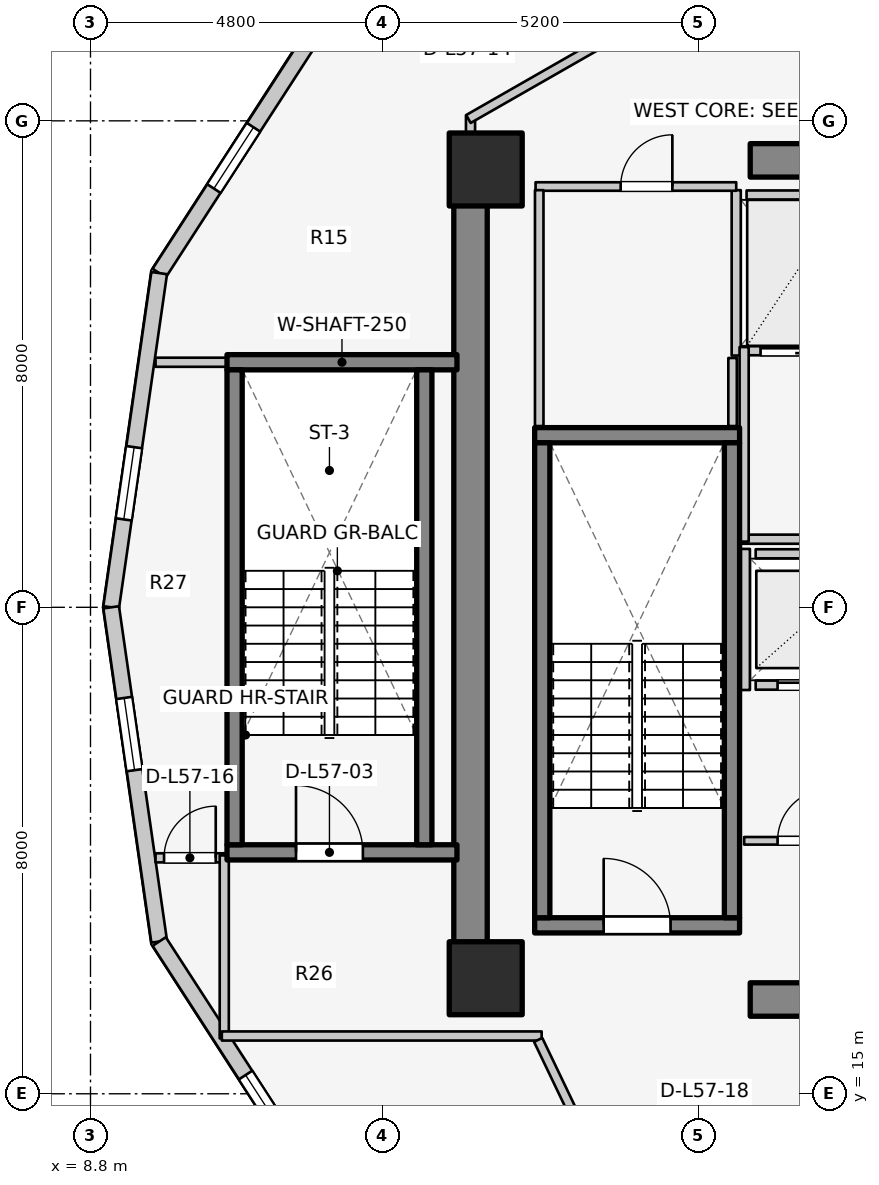
"""IFC4 building model, lengths in metres.
Left out: names, types, materials, properties, quantities, classifications, styles, units other than length and angle.
Written with IfcOpenShell. Run it as: python <this file> out.ifc"""

import sys

from ifc_helpers import new_model, si_unit, direction, frame, frame_2d, origin, origin_2d, place, context, subcontext, project, spatial, rectangle, extrude, element, fill, save


model = new_model("IFC4")
c1 = context("Model", 3, precision=1e-05, world=origin(), true_north=direction((0.0, 1.0)))
c2 = subcontext(c1, "Body", "Model", "MODEL_VIEW")
j1 = project(units=[si_unit("LENGTHUNIT", "METRE"), si_unit("PLANEANGLEUNIT", "RADIAN")], contexts=[c1])
p1 = place(None, origin())
s1 = spatial("IfcSite", under=j1, at=p1, CompositionType="ELEMENT")
p2 = place(p1, origin())
s2 = spatial("IfcBuilding", under=s1, at=p2, CompositionType="ELEMENT")
p3 = place(p2, frame((0.0, 0.0, 187.0)))
s3 = spatial("IfcBuildingStorey", under=s2, at=p3, CompositionType="ELEMENT", Elevation=187.0)
p4 = place(p3, frame((15.05, 17.05, 0.0), z_axis=(0.0, 0.0, 1.0), x_axis=(0.0, 1.0, 0.0)))
e1 = element("IfcWall", 1, at=p4, inside=s3, PredefinedType="SHEAR", context=c2, shape_type="SweptSolid", body=[
    extrude(rectangle(XDim=12.8, YDim=0.55, at=frame_2d((6.4, 0.0))), origin(), (0.0, 0.0, 1.0), 3.1),
])
for number, where, z_axis, x_axis in (
    (2, (19.65, 16.55, 0.0), (0.0, 0.0, 1.0), (1.0, 0.0, 0.0)),
    (3, (19.65, 30.35, 0.0), (0.0, 0.0, 1.0), (1.0, 0.0, 0.0)),
):
    element("IfcWall", number, at=place(p3, frame(where, z_axis=z_axis, x_axis=x_axis)), inside=s3, PredefinedType="SHEAR", context=c2, shape_type="SweptSolid", body=[
        extrude(rectangle(XDim=4.5, YDim=0.55, at=frame_2d((2.25, 0.0))), origin(), (0.0, 0.0, 1.0), 3.1),
    ])
p5 = place(p3, frame((16.105, 17.77, 0.0), z_axis=(0.0, 0.0, 1.0), x_axis=(1.0, 0.0, 0.0)))
e4 = element("IfcWall", 4, at=p5, inside=s3, PredefinedType="SOLIDWALL", context=c2, shape_type="SweptSolid", body=[
    extrude(rectangle(XDim=3.37, YDim=0.25, at=frame_2d((1.685, 0.0))), origin(), (0.0, 0.0, 1.0), 3.1),
])
p6 = place(p5, frame((1.135, 0.0, 0.0)))
e5 = element("IfcOpeningElement", 5, at=p6, cuts=e4, PredefinedType="OPENING", context=c2, shape_type="SweptSolid", body=[
    extrude(rectangle(XDim=1.1, YDim=2.1, at=frame_2d((0.55, 1.05))), frame((0.0, 0.135, 0.0), z_axis=(0.0, -1.0, 0.0), x_axis=(1.0, 0.0, 0.0)), (0.0, 0.0, 1.0), 0.27),
])
p7 = place(p3, frame((16.105, 25.83, 0.0), z_axis=(0.0, 0.0, 1.0), x_axis=(1.0, 0.0, 0.0)))
e6 = element("IfcWall", 6, at=p7, inside=s3, PredefinedType="SOLIDWALL", context=c2, shape_type="SweptSolid", body=[
    extrude(rectangle(XDim=3.37, YDim=0.25, at=frame_2d((1.685, 0.0))), origin(), (0.0, 0.0, 1.0), 3.1),
])
for number, where, z_axis, x_axis in (
    (7, (16.23, 17.895, 0.0), (0.0, 0.0, 1.0), (0.0, 1.0, 0.0)),
    (8, (19.35, 17.895, 0.0), (0.0, 0.0, 1.0), (0.0, 1.0, 0.0)),
):
    element("IfcWall", number, at=place(p3, frame(where, z_axis=z_axis, x_axis=x_axis)), inside=s3, PredefinedType="SOLIDWALL", context=c2, shape_type="SweptSolid", body=[
        extrude(rectangle(XDim=7.81, YDim=0.25, at=frame_2d((3.905, 0.0))), origin(), (0.0, 0.0, 1.0), 3.1),
    ])
p8 = place(p3, frame((11.045, 18.97, 0.0), z_axis=(0.0, 0.0, 1.0), x_axis=(1.0, 0.0, 0.0)))
e9 = element("IfcWall", 9, at=p8, inside=s3, PredefinedType="SOLIDWALL", context=c2, shape_type="SweptSolid", body=[
    extrude(rectangle(XDim=3.782, YDim=0.25, at=frame_2d((1.891, 0.0))), origin(), (0.0, 0.0, 1.0), 3.1),
])
p9 = place(p8, frame((1.135, 0.0, 0.0)))
e10 = element("IfcOpeningElement", 10, at=p9, cuts=e9, PredefinedType="OPENING", context=c2, shape_type="SweptSolid", body=[
    extrude(rectangle(XDim=1.1, YDim=2.1, at=frame_2d((0.55, 1.05))), frame((0.0, 0.135, 0.0), z_axis=(0.0, -1.0, 0.0), x_axis=(1.0, 0.0, 0.0)), (0.0, 0.0, 1.0), 0.27),
])
p10 = place(p3, frame((11.045, 27.03, 0.0), z_axis=(0.0, 0.0, 1.0), x_axis=(1.0, 0.0, 0.0)))
e11 = element("IfcWall", 11, at=p10, inside=s3, PredefinedType="SOLIDWALL", context=c2, shape_type="SweptSolid", body=[
    extrude(rectangle(XDim=3.782, YDim=0.25, at=frame_2d((1.891, 0.0))), origin(), (0.0, 0.0, 1.0), 3.1),
])
for number, where, z_axis, x_axis in (
    (12, (11.17, 19.095, 0.0), (0.0, 0.0, 1.0), (0.0, 1.0, 0.0)),
    (13, (14.29, 19.095, 0.0), (0.0, 0.0, 1.0), (0.0, 1.0, 0.0)),
):
    element("IfcWall", number, at=place(p3, frame(where, z_axis=z_axis, x_axis=x_axis)), inside=s3, PredefinedType="SOLIDWALL", context=c2, shape_type="SweptSolid", body=[
        extrude(rectangle(XDim=7.81, YDim=0.25, at=frame_2d((3.905, 0.0))), origin(), (0.0, 0.0, 1.0), 3.1),
    ])
for number, where, z_axis, x_axis in (
    (14, (15.3, 16.9, 0.0), (0.0, 0.0, 1.0), (1.0, 0.0, 0.0)),
    (15, (15.3, 30.2, 0.0), (0.0, 0.0, 1.0), (1.0, 0.0, 0.0)),
):
    element("IfcColumn", number, at=place(p3, frame(where, z_axis=z_axis, x_axis=x_axis)), inside=s3, PredefinedType="COLUMN", context=c2, shape_type="SweptSolid", body=[
        extrude(rectangle(XDim=1.2, YDim=1.2, at=origin_2d()), origin(), (0.0, 0.0, 1.0), 3.1),
    ])
p11 = place(p3, frame((12.381, 32.284, 0.0), z_axis=(0.0, 0.0, 1.0), x_axis=(-0.543358984534, -0.839500454989, 0.0)))
e16 = element("IfcWall", 16, at=p11, inside=s3, PredefinedType="STANDARD", context=c2, shape_type="SweptSolid", body=[
    extrude(rectangle(XDim=4.511, YDim=0.26, at=frame_2d((2.256, 0.0))), origin(), (0.0, 0.0, 1.0), 1.22),
])
p12 = place(p11, frame((1.656, 0.0, 0.15)))
e17 = element("IfcOpeningElement", 17, at=p12, cuts=e16, PredefinedType="OPENING", context=c2, shape_type="SweptSolid", body=[
    extrude(rectangle(XDim=1.2, YDim=0.9, at=frame_2d((0.6, 0.45))), frame((0.0, 0.14, 0.0), z_axis=(0.0, -1.0, 0.0), x_axis=(1.0, 0.0, 0.0)), (0.0, 0.0, 1.0), 0.28),
])
p13 = place(p3, frame((9.93, 28.497, 0.0), z_axis=(0.0, 0.0, 1.0), x_axis=(-0.142227632286, -0.989833976288, 0.0)))
e18 = element("IfcWall", 18, at=p13, inside=s3, PredefinedType="STANDARD", context=c2, shape_type="SweptSolid", body=[
    extrude(rectangle(XDim=5.553, YDim=0.26, at=frame_2d((2.776, 0.0))), origin(), (0.0, 0.0, 1.0), 2.57),
])
p14 = place(p13, frame((2.892, 0.0, 0.75)))
e19 = element("IfcOpeningElement", 19, at=p14, cuts=e18, PredefinedType="OPENING", context=c2, shape_type="SweptSolid", body=[
    extrude(rectangle(XDim=1.2, YDim=1.5, at=frame_2d((0.6, 0.75))), frame((0.0, 0.14, 0.0), z_axis=(0.0, -1.0, 0.0), x_axis=(1.0, 0.0, 0.0)), (0.0, 0.0, 1.0), 0.28),
])
p15 = place(p3, frame((9.14, 23.0, 0.0), z_axis=(0.0, 0.0, 1.0), x_axis=(0.142227632286, -0.989833976288, 0.0)))
e20 = element("IfcWall", 20, at=p15, inside=s3, PredefinedType="STANDARD", context=c2, shape_type="SweptSolid", body=[
    extrude(rectangle(XDim=5.553, YDim=0.26, at=frame_2d((2.776, 0.0))), origin(), (0.0, 0.0, 1.0), 2.57),
])
p16 = place(p15, frame((1.506, 0.0, 0.75)))
e21 = element("IfcOpeningElement", 21, at=p16, cuts=e20, PredefinedType="OPENING", context=c2, shape_type="SweptSolid", body=[
    extrude(rectangle(XDim=1.2, YDim=1.5, at=frame_2d((0.6, 0.75))), frame((0.0, 0.14, 0.0), z_axis=(0.0, -1.0, 0.0), x_axis=(1.0, 0.0, 0.0)), (0.0, 0.0, 1.0), 0.28),
])
p17 = place(p3, frame((9.93, 17.503, 0.0), z_axis=(0.0, 0.0, 1.0), x_axis=(0.543358984534, -0.839500454989, 0.0)))
e22 = element("IfcWall", 22, at=p17, inside=s3, PredefinedType="STANDARD", context=c2, shape_type="SweptSolid", body=[
    extrude(rectangle(XDim=4.511, YDim=0.26, at=frame_2d((2.256, 0.0))), origin(), (0.0, 0.0, 1.0), 1.22),
])
p18 = place(p17, frame((2.615, 0.0, 0.15)))
e23 = element("IfcOpeningElement", 23, at=p18, cuts=e22, PredefinedType="OPENING", context=c2, shape_type="SweptSolid", body=[
    extrude(rectangle(XDim=1.2, YDim=0.9, at=frame_2d((0.6, 0.45))), frame((0.0, 0.14, 0.0), z_axis=(0.0, -1.0, 0.0), x_axis=(1.0, 0.0, 0.0)), (0.0, 0.0, 1.0), 0.28),
])
p19 = place(p3, frame((19.74, 21.72, 0.0), z_axis=(0.0, 0.0, 1.0), x_axis=(1.0, 0.0, 0.0)))
e24 = element("IfcWall", 24, at=p19, inside=s3, PredefinedType="SOLIDWALL", context=c2, shape_type="SweptSolid", body=[
    extrude(rectangle(XDim=1.82, YDim=0.15, at=frame_2d((0.91, 0.0))), origin(), (0.0, 0.0, 1.0), 2.575),
])
p20 = place(p19, frame((0.36, 0.0, 0.0)))
e25 = element("IfcOpeningElement", 25, at=p20, cuts=e24, PredefinedType="OPENING", context=c2, shape_type="SweptSolid", body=[
    extrude(rectangle(XDim=1.1, YDim=2.1, at=frame_2d((0.55, 1.05))), frame((0.0, 0.085, 0.0), z_axis=(0.0, -1.0, 0.0), x_axis=(1.0, 0.0, 0.0)), (0.0, 0.0, 1.0), 0.17),
])
p21 = place(p3, frame((19.74, 23.88, 0.0), z_axis=(0.0, 0.0, 1.0), x_axis=(1.0, 0.0, 0.0)))
e26 = element("IfcWall", 26, at=p21, inside=s3, PredefinedType="SOLIDWALL", context=c2, shape_type="SweptSolid", body=[
    extrude(rectangle(XDim=1.82, YDim=0.15, at=frame_2d((0.91, 0.0))), origin(), (0.0, 0.0, 1.0), 2.575),
])
p22 = place(p3, frame((19.57, 21.64, 0.0), z_axis=(0.0, 0.0, 1.0), x_axis=(0.0, 1.0, 0.0)))
e27 = element("IfcWall", 27, at=p22, inside=s3, PredefinedType="SOLIDWALL", context=c2, shape_type="SweptSolid", body=[
    extrude(rectangle(XDim=2.32, YDim=0.15, at=frame_2d((1.16, 0.0))), origin(), (0.0, 0.0, 1.0), 2.575),
])
p23 = place(p3, frame((19.59, 27.22, 0.0), z_axis=(0.0, 0.0, 1.0), x_axis=(1.0, 0.0, 0.0)))
e28 = element("IfcWall", 28, at=p23, inside=s3, PredefinedType="SOLIDWALL", context=c2, shape_type="SweptSolid", body=[
    extrude(rectangle(XDim=1.76, YDim=0.15, at=frame_2d((0.88, 0.0))), origin(), (0.0, 0.0, 1.0), 2.575),
])
p24 = place(p23, frame((0.23, 0.0, 0.0)))
e29 = element("IfcOpeningElement", 29, at=p24, cuts=e28, PredefinedType="OPENING", context=c2, shape_type="SweptSolid", body=[
    extrude(rectangle(XDim=1.3, YDim=2.1, at=frame_2d((0.65, 1.05))), frame((0.0, 0.085, 0.0), z_axis=(0.0, -1.0, 0.0), x_axis=(1.0, 0.0, 0.0)), (0.0, 0.0, 1.0), 0.17),
])
p25 = place(p3, frame((19.59, 29.78, 0.0), z_axis=(0.0, 0.0, 1.0), x_axis=(1.0, 0.0, 0.0)))
e30 = element("IfcWall", 30, at=p25, inside=s3, PredefinedType="SOLIDWALL", context=c2, shape_type="SweptSolid", body=[
    extrude(rectangle(XDim=1.76, YDim=0.15, at=frame_2d((0.88, 0.0))), origin(), (0.0, 0.0, 1.0), 2.575),
])
p26 = place(p3, frame((19.42, 27.14, 0.0), z_axis=(0.0, 0.0, 1.0), x_axis=(0.0, 1.0, 0.0)))
e31 = element("IfcWall", 31, at=p26, inside=s3, PredefinedType="SOLIDWALL", context=c2, shape_type="SweptSolid", body=[
    extrude(rectangle(XDim=2.72, YDim=0.15, at=frame_2d((1.36, 0.0))), origin(), (0.0, 0.0, 1.0), 2.575),
])
p27 = place(p3, frame((19.52, 24.12, 0.0), z_axis=(0.0, 0.0, 1.0), x_axis=(1.0, 0.0, 0.0)))
e32 = element("IfcWall", 32, at=p27, inside=s3, PredefinedType="PARTITIONING", context=c2, shape_type="SweptSolid", body=[
    extrude(rectangle(XDim=5.08, YDim=0.15, at=frame_2d((2.54, 0.0))), origin(), (0.0, 0.0, 1.0), 2.12),
])
p28 = place(p3, frame((19.55, 24.08, 0.0), z_axis=(0.0, 0.0, 1.0), x_axis=(0.0, 1.0, 0.0)))
e33 = element("IfcWall", 33, at=p28, inside=s3, PredefinedType="PARTITIONING", context=c2, shape_type="SweptSolid", body=[
    extrude(rectangle(XDim=3.2, YDim=0.15, at=frame_2d((1.6, 0.0))), origin(), (0.0, 0.0, 1.0), 2.575),
])
p29 = place(p3, frame((19.55, 19.16, 0.0), z_axis=(0.0, 0.0, 1.0), x_axis=(1.0, 0.0, 0.0)))
e34 = element("IfcWall", 34, at=p29, inside=s3, PredefinedType="PARTITIONING", context=c2, shape_type="SweptSolid", body=[
    extrude(rectangle(XDim=3.45, YDim=0.125, at=frame_2d((1.725, 0.0))), origin(), (0.0, 0.0, 1.0), 2.12),
])
p30 = place(p29, frame((0.55, 0.0, 0.0)))
e35 = element("IfcOpeningElement", 35, at=p30, cuts=e34, PredefinedType="OPENING", context=c2, shape_type="SweptSolid", body=[
    extrude(rectangle(XDim=0.85, YDim=2.05, at=frame_2d((0.425, 1.025))), frame((0.0, 0.073, 0.0), z_axis=(0.0, -1.0, 0.0), x_axis=(1.0, 0.0, 0.0)), (0.0, 0.0, 1.0), 0.145),
])
p31 = place(p3, frame((16.12, 29.92, 0.0), z_axis=(0.0, 0.0, 1.0), x_axis=(1.0, 0.0, 0.0)))
e36 = element("IfcWall", 36, at=p31, inside=s3, PredefinedType="PLUMBINGWALL", context=c2, shape_type="SweptSolid", body=[
    extrude(rectangle(XDim=3.3, YDim=0.14, at=frame_2d((1.65, 0.0))), origin(), (0.0, 0.0, 1.0), 2.575),
])
p32 = place(p31, frame((1.399, 0.0, 0.0)))
e37 = element("IfcOpeningElement", 37, at=p32, cuts=e36, PredefinedType="OPENING", context=c2, shape_type="SweptSolid", body=[
    extrude(rectangle(XDim=0.85, YDim=2.05, at=frame_2d((0.425, 1.025))), frame((0.0, 0.08, 0.0), z_axis=(0.0, -1.0, 0.0), x_axis=(1.0, 0.0, 0.0)), (0.0, 0.0, 1.0), 0.16),
])
p33 = place(p3, frame((16.18, 25.98, 0.0), z_axis=(0.0, 0.0, 1.0), x_axis=(0.0, 1.0, 0.0)))
e38 = element("IfcWall", 38, at=p33, inside=s3, PredefinedType="PLUMBINGWALL", context=c2, shape_type="SweptSolid", body=[
    extrude(rectangle(XDim=3.88, YDim=0.14, at=frame_2d((1.94, 0.0))), origin(), (0.0, 0.0, 1.0), 2.575),
])
p34 = place(p3, frame((19.36, 25.98, 0.0), z_axis=(0.0, 0.0, 1.0), x_axis=(0.0, 1.0, 0.0)))
e39 = element("IfcWall", 39, at=p34, inside=s3, PredefinedType="PLUMBINGWALL", context=c2, shape_type="SweptSolid", body=[
    extrude(rectangle(XDim=1.12, YDim=0.14, at=frame_2d((0.56, 0.0))), origin(), (0.0, 0.0, 1.0), 2.575),
])
p35 = place(p3, frame((9.87, 27.03, 0.0), z_axis=(0.0, 0.0, 1.0), x_axis=(1.0, 0.0, 0.0)))
e40 = element("IfcWall", 40, at=p35, inside=s3, PredefinedType="PARTITIONING", context=c2, shape_type="SweptSolid", body=[
    extrude(rectangle(XDim=1.17, YDim=0.15, at=frame_2d((0.585, 0.0))), origin(), (0.0, 0.0, 1.0), 2.575),
])
p36 = place(p3, frame((15.05, 29.8, 0.0), z_axis=(0.0, 0.0, 1.0), x_axis=(0.0, 1.0, 0.0)))
e41 = element("IfcWall", 41, at=p36, inside=s3, PredefinedType="PARTITIONING", context=c2, shape_type="SweptSolid", body=[
    extrude(rectangle(XDim=1.29, YDim=0.15, at=frame_2d((0.645, 0.0))), origin(), (0.0, 0.0, 1.0), 1.22),
])
p37 = place(p3, frame((17.243, 32.305, 0.0), z_axis=(0.0, 0.0, 1.0), x_axis=(-0.867991349648, -0.496579315857, 0.0)))
e42 = element("IfcWall", 42, at=p37, inside=s3, PredefinedType="PARTITIONING", context=c2, shape_type="SweptSolid", body=[
    extrude(rectangle(XDim=2.567, YDim=0.15, at=frame_2d((1.283, 0.0))), origin(), (0.0, 0.0, 1.0), 1.22),
])
p38 = place(p3, frame((9.87, 18.88, 0.0), z_axis=(0.0, 0.0, 1.0), x_axis=(1.0, 0.0, 0.0)))
e43 = element("IfcWall", 43, at=p38, inside=s3, PredefinedType="PARTITIONING", context=c2, shape_type="SweptSolid", body=[
    extrude(rectangle(XDim=1.17, YDim=0.15, at=frame_2d((0.585, 0.0))), origin(), (0.0, 0.0, 1.0), 2.575),
])
p39 = place(p38, frame((0.14, 0.0, 0.0)))
e44 = element("IfcOpeningElement", 44, at=p39, cuts=e43, PredefinedType="OPENING", context=c2, shape_type="SweptSolid", body=[
    extrude(rectangle(XDim=0.85, YDim=2.05, at=frame_2d((0.425, 1.025))), frame((0.0, 0.085, 0.0), z_axis=(0.0, -1.0, 0.0), x_axis=(1.0, 0.0, 0.0)), (0.0, 0.0, 1.0), 0.17),
])
p40 = place(p3, frame((11.0, 15.91, 0.0), z_axis=(0.0, 0.0, 1.0), x_axis=(0.0, 1.0, 0.0)))
e45 = element("IfcWall", 45, at=p40, inside=s3, PredefinedType="PARTITIONING", context=c2, shape_type="SweptSolid", body=[
    extrude(rectangle(XDim=3.01, YDim=0.15, at=frame_2d((1.505, 0.0))), origin(), (0.0, 0.0, 1.0), 2.575),
])
p41 = place(p3, frame((10.96, 15.95, 0.0), z_axis=(0.0, 0.0, 1.0), x_axis=(1.0, 0.0, 0.0)))
e46 = element("IfcWall", 46, at=p41, inside=s3, PredefinedType="PARTITIONING", context=c2, shape_type="SweptSolid", body=[
    extrude(rectangle(XDim=5.26, YDim=0.15, at=frame_2d((2.63, 0.0))), origin(), (0.0, 0.0, 1.0), 1.22),
])
p42 = place(p3, frame((17.222, 13.675, 0.0), z_axis=(0.0, 0.0, 1.0), x_axis=(-0.431973389813, 0.901886351207, 0.0)))
e47 = element("IfcWall", 47, at=p42, inside=s3, PredefinedType="PARTITIONING", context=c2, shape_type="SweptSolid", body=[
    extrude(rectangle(XDim=2.452, YDim=0.15, at=frame_2d((1.226, 0.0))), origin(), (0.0, 0.0, 1.0), 2.575),
])
p43 = place(p12, origin())
e48 = element("IfcWindow", 48, at=p43, inside=s3, PartitioningType="SINGLE_PANEL", PredefinedType="WINDOW", context=c2, shape_type="SweptSolid", body=[
    extrude(rectangle(XDim=1.2, YDim=0.9, at=frame_2d((0.6, 0.45))), frame((0.0, 0.03, 0.0), z_axis=(0.0, -1.0, 0.0), x_axis=(1.0, 0.0, 0.0)), (0.0, 0.0, 1.0), 0.06),
])
fill(e17, e48)
p44 = place(p14, origin())
e49 = element("IfcWindow", 49, at=p44, inside=s3, PartitioningType="SINGLE_PANEL", PredefinedType="WINDOW", context=c2, shape_type="SweptSolid", body=[
    extrude(rectangle(XDim=1.2, YDim=1.5, at=frame_2d((0.6, 0.75))), frame((0.0, 0.03, 0.0), z_axis=(0.0, -1.0, 0.0), x_axis=(1.0, 0.0, 0.0)), (0.0, 0.0, 1.0), 0.06),
])
fill(e19, e49)
p45 = place(p16, origin())
e50 = element("IfcWindow", 50, at=p45, inside=s3, PartitioningType="SINGLE_PANEL", PredefinedType="WINDOW", context=c2, shape_type="SweptSolid", body=[
    extrude(rectangle(XDim=1.2, YDim=1.5, at=frame_2d((0.6, 0.75))), frame((0.0, 0.03, 0.0), z_axis=(0.0, -1.0, 0.0), x_axis=(1.0, 0.0, 0.0)), (0.0, 0.0, 1.0), 0.06),
])
fill(e21, e50)
p46 = place(p18, origin())
e51 = element("IfcWindow", 51, at=p46, inside=s3, PartitioningType="SINGLE_PANEL", PredefinedType="WINDOW", context=c2, shape_type="SweptSolid", body=[
    extrude(rectangle(XDim=1.2, YDim=0.9, at=frame_2d((0.6, 0.45))), frame((0.0, 0.03, 0.0), z_axis=(0.0, -1.0, 0.0), x_axis=(1.0, 0.0, 0.0)), (0.0, 0.0, 1.0), 0.06),
])
fill(e23, e51)
p47 = place(p6, origin())
e52 = element("IfcDoor", 52, at=p47, inside=s3, OperationType="SINGLE_SWING_LEFT", PredefinedType="DOOR", context=c2, shape_type="SweptSolid", body=[
    extrude(rectangle(XDim=1.1, YDim=2.1, at=frame_2d((0.55, 1.05))), frame((0.0, 0.025, 0.0), z_axis=(0.0, -1.0, 0.0), x_axis=(1.0, 0.0, 0.0)), (0.0, 0.0, 1.0), 0.05),
])
fill(e5, e52)
p48 = place(p9, origin())
e53 = element("IfcDoor", 53, at=p48, inside=s3, OperationType="SINGLE_SWING_LEFT", PredefinedType="DOOR", context=c2, shape_type="SweptSolid", body=[
    extrude(rectangle(XDim=1.1, YDim=2.1, at=frame_2d((0.55, 1.05))), frame((0.0, 0.025, 0.0), z_axis=(0.0, -1.0, 0.0), x_axis=(1.0, 0.0, 0.0)), (0.0, 0.0, 1.0), 0.05),
])
fill(e10, e53)
p49 = place(p20, origin())
e54 = element("IfcDoor", 54, at=p49, inside=s3, OperationType="DOUBLE_DOOR_SLIDING", PredefinedType="DOOR", context=c2, shape_type="SweptSolid", body=[
    extrude(rectangle(XDim=1.1, YDim=2.1, at=frame_2d((0.55, 1.05))), frame((0.0, 0.025, 0.0), z_axis=(0.0, -1.0, 0.0), x_axis=(1.0, 0.0, 0.0)), (0.0, 0.0, 1.0), 0.05),
])
fill(e25, e54)
p50 = place(p24, origin())
e55 = element("IfcDoor", 55, at=p50, inside=s3, OperationType="DOUBLE_DOOR_SLIDING", PredefinedType="DOOR", context=c2, shape_type="SweptSolid", body=[
    extrude(rectangle(XDim=1.3, YDim=2.1, at=frame_2d((0.65, 1.05))), frame((0.0, 0.025, 0.0), z_axis=(0.0, -1.0, 0.0), x_axis=(1.0, 0.0, 0.0)), (0.0, 0.0, 1.0), 0.05),
])
fill(e29, e55)
p51 = place(p30, origin())
e56 = element("IfcDoor", 56, at=p51, inside=s3, OperationType="SINGLE_SWING_RIGHT", PredefinedType="DOOR", context=c2, shape_type="SweptSolid", body=[
    extrude(rectangle(XDim=0.85, YDim=2.05, at=frame_2d((0.425, 1.025))), frame((0.0, 0.025, 0.0), z_axis=(0.0, -1.0, 0.0), x_axis=(1.0, 0.0, 0.0)), (0.0, 0.0, 1.0), 0.05),
])
fill(e35, e56)
p52 = place(p32, origin())
e57 = element("IfcDoor", 57, at=p52, inside=s3, OperationType="SINGLE_SWING_RIGHT", PredefinedType="DOOR", context=c2, shape_type="SweptSolid", body=[
    extrude(rectangle(XDim=0.85, YDim=2.05, at=frame_2d((0.425, 1.025))), frame((0.0, 0.025, 0.0), z_axis=(0.0, -1.0, 0.0), x_axis=(1.0, 0.0, 0.0)), (0.0, 0.0, 1.0), 0.05),
])
fill(e37, e57)
p53 = place(p39, origin())
e58 = element("IfcDoor", 58, at=p53, inside=s3, OperationType="SINGLE_SWING_RIGHT", PredefinedType="DOOR", context=c2, shape_type="SweptSolid", body=[
    extrude(rectangle(XDim=0.85, YDim=2.05, at=frame_2d((0.425, 1.025))), frame((0.0, 0.025, 0.0), z_axis=(0.0, -1.0, 0.0), x_axis=(1.0, 0.0, 0.0)), (0.0, 0.0, 1.0), 0.05),
])
fill(e44, e58)
save(model, sys.argv[1])
